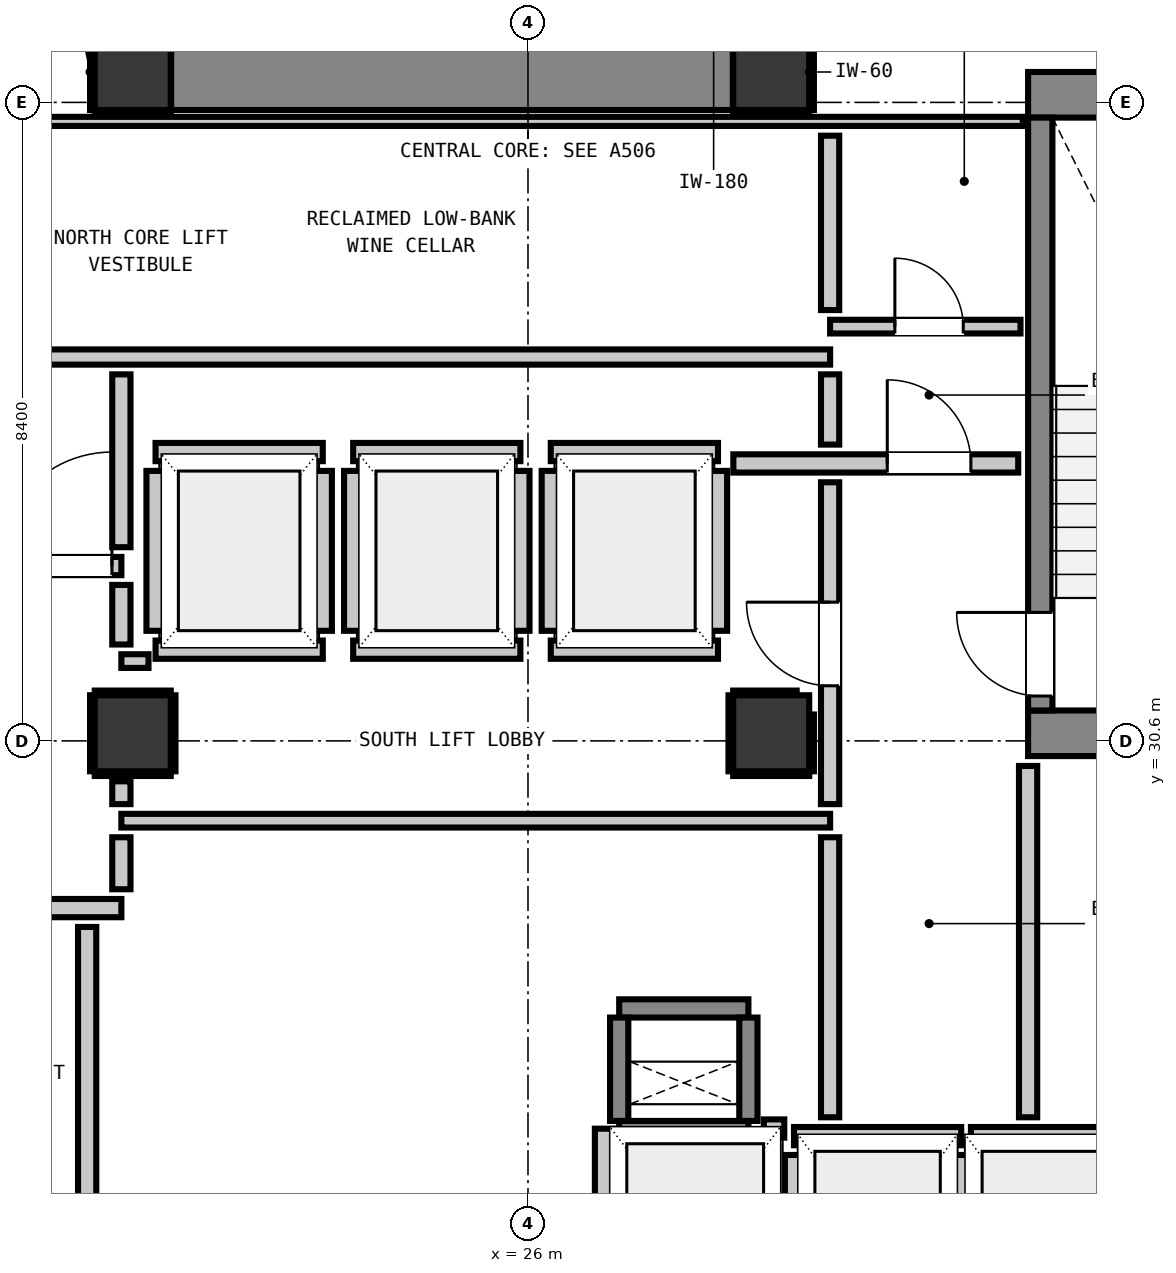
"""IFC4 building model, lengths in metres.
Left out: names, types, materials, properties, quantities, classifications, styles, units other than length and angle.
Written with IfcOpenShell. Run it as: python <this file> out.ifc"""

import sys

from ifc_helpers import new_model, si_unit, direction, frame, frame_2d, origin, origin_2d, place, context, subcontext, project, spatial, rectangle, extrude, element, fill, save


model = new_model("IFC4")
c1 = context("Model", 3, precision=1e-05, world=origin(), true_north=direction((0.0, 1.0)))
c2 = subcontext(c1, "Body", "Model", "MODEL_VIEW")
j1 = project(units=[si_unit("LENGTHUNIT", "METRE"), si_unit("PLANEANGLEUNIT", "RADIAN")], contexts=[c1])
p1 = place(None, origin())
s1 = spatial("IfcSite", under=j1, at=p1, CompositionType="ELEMENT")
p2 = place(p1, origin())
s2 = spatial("IfcBuilding", under=s1, at=p2, CompositionType="ELEMENT")
p3 = place(p2, frame((0.0, 0.0, 109.4)))
s3 = spatial("IfcBuildingStorey", under=s2, at=p3, CompositionType="ELEMENT", Elevation=109.4)
for number, where, z_axis, x_axis in (
    (1, (20.8, 39.4, 0.0), (0.0, 0.0, 1.0), (1.0, 0.0, 0.0)),
    (2, (29.2, 39.4, 0.0), (0.0, 0.0, 1.0), (1.0, 0.0, 0.0)),
):
    element("IfcColumn", number, at=place(p3, frame(where, z_axis=z_axis, x_axis=x_axis)), inside=s3, PredefinedType="COLUMN", context=c2, shape_type="SweptSolid", body=[
        extrude(rectangle(XDim=1.0, YDim=1.0, at=origin_2d()), origin(), (0.0, 0.0, 1.0), 3.32),
    ])
p4 = place(p3, frame((32.58, 39.1, 0.0), z_axis=(0.0, 0.0, 1.0), x_axis=(1.0, 0.0, 0.0)))
e3 = element("IfcWall", 3, at=p4, inside=s3, PredefinedType="SHEAR", context=c2, shape_type="SweptSolid", body=[
    extrude(rectangle(XDim=4.08, YDim=0.6, at=frame_2d((2.04, 0.0))), origin(), (0.0, 0.0, 1.0), 3.32),
])
p5 = place(p3, frame((32.58, 30.7, 0.0), z_axis=(0.0, 0.0, 1.0), x_axis=(1.0, 0.0, 0.0)))
e4 = element("IfcWall", 4, at=p5, inside=s3, PredefinedType="SHEAR", context=c2, shape_type="SweptSolid", body=[
    extrude(rectangle(XDim=3.415, YDim=0.6, at=frame_2d((1.708, 0.0))), origin(), (0.0, 0.0, 1.0), 3.32),
])
p6 = place(p3, frame((21.305, 39.4, 0.0), z_axis=(0.0, 0.0, 1.0), x_axis=(1.0, 0.0, 0.0)))
e5 = element("IfcWall", 5, at=p6, inside=s3, PredefinedType="SHEAR", context=c2, shape_type="SweptSolid", body=[
    extrude(rectangle(XDim=7.39, YDim=1.0, at=frame_2d((3.695, 0.0))), origin(), (0.0, 0.0, 1.0), 3.32),
])
p7 = place(p3, frame((32.74, 31.0, 0.0), z_axis=(0.0, 0.0, 1.0), x_axis=(0.0, 1.0, 0.0)))
e6 = element("IfcWall", 6, at=p7, inside=s3, PredefinedType="SHEAR", context=c2, shape_type="SweptSolid", body=[
    extrude(rectangle(XDim=7.8, YDim=0.32, at=frame_2d((3.9, 0.0))), origin(), (0.0, 0.0, 1.0), 3.32),
])
p8 = place(p7, frame((0.19, 0.0, 0.0)))
e7 = element("IfcOpeningElement", 7, at=p8, cuts=e6, PredefinedType="OPENING", context=c2, shape_type="SweptSolid", body=[
    extrude(rectangle(XDim=1.1, YDim=2.15, at=frame_2d((0.55, 1.075))), frame((0.0, 0.17, 0.0), z_axis=(0.0, -1.0, 0.0), x_axis=(1.0, 0.0, 0.0)), (0.0, 0.0, 1.0), 0.34),
])
for number, where, z_axis, x_axis in (
    (8, (27.2, 25.48, 0.0), (0.0, 0.0, 1.0), (1.0, 0.0, 0.0)),
    (9, (27.2, 27.08, 0.0), (0.0, 0.0, 1.0), (1.0, 0.0, 0.0)),
):
    element("IfcWall", number, at=place(p3, frame(where, z_axis=z_axis, x_axis=x_axis)), inside=s3, PredefinedType="SHEAR", context=c2, shape_type="SweptSolid", body=[
        extrude(rectangle(XDim=1.7, YDim=0.24, at=frame_2d((0.85, 0.0))), origin(), (0.0, 0.0, 1.0), 3.32),
    ])
for number, where, z_axis, x_axis in (
    (10, (27.2, 25.6, 0.0), (0.0, 0.0, 1.0), (0.0, 1.0, 0.0)),
    (11, (28.9, 25.6, 0.0), (0.0, 0.0, 1.0), (0.0, 1.0, 0.0)),
):
    element("IfcWall", number, at=place(p3, frame(where, z_axis=z_axis, x_axis=x_axis)), inside=s3, PredefinedType="SHEAR", context=c2, shape_type="SweptSolid", body=[
        extrude(rectangle(XDim=1.36, YDim=0.24, at=frame_2d((0.68, 0.0))), origin(), (0.0, 0.0, 1.0), 3.32),
    ])
for number, where, z_axis, x_axis in (
    (12, (20.8, 30.7, 0.0), (0.0, 0.0, 1.0), (1.0, 0.0, 0.0)),
    (13, (29.2, 30.7, 0.0), (0.0, 0.0, 1.0), (1.0, 0.0, 0.0)),
):
    element("IfcColumn", number, at=place(p3, frame(where, z_axis=z_axis, x_axis=x_axis)), inside=s3, PredefinedType="COLUMN", context=c2, shape_type="SweptSolid", body=[
        extrude(rectangle(XDim=1.0, YDim=1.0, at=origin_2d()), origin(), (0.0, 0.0, 1.0), 3.32),
    ])
for number, where, z_axis, x_axis in (
    (14, (21.1, 31.8, 0.0), (0.0, 0.0, 1.0), (1.0, 0.0, 0.0)),
    (15, (21.1, 34.4, 0.0), (0.0, 0.0, 1.0), (1.0, 0.0, 0.0)),
):
    element("IfcWall", number, at=place(p3, frame(where, z_axis=z_axis, x_axis=x_axis)), inside=s3, PredefinedType="PARTITIONING", context=c2, shape_type="SweptSolid", body=[
        extrude(rectangle(XDim=2.2, YDim=0.24, at=frame_2d((1.1, 0.0))), origin(), (0.0, 0.0, 1.0), 3.08),
    ])
p9 = place(p3, frame((21.1, 32.048, 0.0), z_axis=(0.0, 0.0, 1.0), x_axis=(0.0, 1.0, 0.0)))
e16 = element("IfcWall", 16, at=p9, inside=s3, PredefinedType="PARTITIONING", context=c2, shape_type="SweptSolid", body=[
    extrude(rectangle(XDim=2.104, YDim=0.24, at=frame_2d((1.052, 0.0))), origin(), (0.0, 0.0, 1.0), 2.315),
])
p10 = place(p3, frame((23.3, 32.048, 0.0), z_axis=(0.0, 0.0, 1.0), x_axis=(0.0, 1.0, 0.0)))
e17 = element("IfcWall", 17, at=p10, inside=s3, PredefinedType="PARTITIONING", context=c2, shape_type="SweptSolid", body=[
    extrude(rectangle(XDim=2.104, YDim=0.24, at=frame_2d((1.052, 0.0))), origin(), (0.0, 0.0, 1.0), 3.08),
])
for number, where, z_axis, x_axis in (
    (18, (23.7, 31.8, 0.0), (0.0, 0.0, 1.0), (1.0, 0.0, 0.0)),
    (19, (23.7, 34.4, 0.0), (0.0, 0.0, 1.0), (1.0, 0.0, 0.0)),
):
    element("IfcWall", number, at=place(p3, frame(where, z_axis=z_axis, x_axis=x_axis)), inside=s3, PredefinedType="PARTITIONING", context=c2, shape_type="SweptSolid", body=[
        extrude(rectangle(XDim=2.2, YDim=0.24, at=frame_2d((1.1, 0.0))), origin(), (0.0, 0.0, 1.0), 3.08),
    ])
for number, where, z_axis, x_axis in (
    (20, (23.7, 32.048, 0.0), (0.0, 0.0, 1.0), (0.0, 1.0, 0.0)),
    (21, (25.9, 32.048, 0.0), (0.0, 0.0, 1.0), (0.0, 1.0, 0.0)),
):
    element("IfcWall", number, at=place(p3, frame(where, z_axis=z_axis, x_axis=x_axis)), inside=s3, PredefinedType="PARTITIONING", context=c2, shape_type="SweptSolid", body=[
        extrude(rectangle(XDim=2.104, YDim=0.24, at=frame_2d((1.052, 0.0))), origin(), (0.0, 0.0, 1.0), 3.08),
    ])
for number, where, z_axis, x_axis in (
    (22, (26.3, 31.8, 0.0), (0.0, 0.0, 1.0), (1.0, 0.0, 0.0)),
    (23, (26.3, 34.4, 0.0), (0.0, 0.0, 1.0), (1.0, 0.0, 0.0)),
):
    element("IfcWall", number, at=place(p3, frame(where, z_axis=z_axis, x_axis=x_axis)), inside=s3, PredefinedType="PARTITIONING", context=c2, shape_type="SweptSolid", body=[
        extrude(rectangle(XDim=2.2, YDim=0.24, at=frame_2d((1.1, 0.0))), origin(), (0.0, 0.0, 1.0), 3.08),
    ])
for number, where, z_axis, x_axis in (
    (24, (26.3, 32.048, 0.0), (0.0, 0.0, 1.0), (0.0, 1.0, 0.0)),
    (25, (28.5, 32.048, 0.0), (0.0, 0.0, 1.0), (0.0, 1.0, 0.0)),
):
    element("IfcWall", number, at=place(p3, frame(where, z_axis=z_axis, x_axis=x_axis)), inside=s3, PredefinedType="PARTITIONING", context=c2, shape_type="SweptSolid", body=[
        extrude(rectangle(XDim=2.104, YDim=0.24, at=frame_2d((1.052, 0.0))), origin(), (0.0, 0.0, 1.0), 3.08),
    ])
p11 = place(p3, frame((29.5, 25.4, 0.0), z_axis=(0.0, 0.0, 1.0), x_axis=(1.0, 0.0, 0.0)))
e26 = element("IfcWall", 26, at=p11, inside=s3, PredefinedType="PARTITIONING", context=c2, shape_type="SweptSolid", body=[
    extrude(rectangle(XDim=2.2, YDim=0.24, at=frame_2d((1.1, 0.0))), origin(), (0.0, 0.0, 1.0), 3.08),
])
p12 = place(p3, frame((29.5, 22.632, 0.0), z_axis=(0.0, 0.0, 1.0), x_axis=(0.0, 1.0, 0.0)))
e27 = element("IfcWall", 27, at=p12, inside=s3, PredefinedType="PARTITIONING", context=c2, shape_type="SweptSolid", body=[
    extrude(rectangle(XDim=2.52, YDim=0.24, at=frame_2d((1.26, 0.0))), origin(), (0.0, 0.0, 1.0), 2.315),
])
p13 = place(p3, frame((31.7, 22.63, 0.0), z_axis=(0.0, 0.0, 1.0), x_axis=(0.0, 1.0, 0.0)))
e28 = element("IfcWall", 28, at=p13, inside=s3, PredefinedType="PARTITIONING", context=c2, shape_type="SweptSolid", body=[
    extrude(rectangle(XDim=2.522, YDim=0.24, at=frame_2d((1.261, 0.0))), origin(), (0.0, 0.0, 1.0), 3.08),
])
p14 = place(p3, frame((31.828, 25.4, 0.0), z_axis=(0.0, 0.0, 1.0), x_axis=(1.0, 0.0, 0.0)))
e29 = element("IfcWall", 29, at=p14, inside=s3, PredefinedType="PARTITIONING", context=c2, shape_type="SweptSolid", body=[
    extrude(rectangle(XDim=2.072, YDim=0.24, at=frame_2d((1.036, 0.0))), origin(), (0.0, 0.0, 1.0), 3.08),
])
p15 = place(p3, frame((29.103, 25.5, 0.0), z_axis=(0.0, 0.0, 1.0), x_axis=(1.0, 0.0, 0.0)))
e30 = element("IfcWall", 30, at=p15, inside=s3, PredefinedType="PARTITIONING", context=c2, shape_type="SweptSolid", body=[
    extrude(rectangle(XDim=0.269, YDim=0.24, at=frame_2d((0.135, 0.0))), origin(), (0.0, 0.0, 1.0), 3.08),
])
p16 = place(p3, frame((27.0, 22.63, 0.0), z_axis=(0.0, 0.0, 1.0), x_axis=(0.0, 1.0, 0.0)))
e31 = element("IfcWall", 31, at=p16, inside=s3, PredefinedType="PARTITIONING", context=c2, shape_type="SweptSolid", body=[
    extrude(rectangle(XDim=2.868, YDim=0.24, at=frame_2d((1.434, 0.0))), origin(), (0.0, 0.0, 1.0), 3.08),
])
p17 = place(p3, frame((17.45, 28.4, 0.0), z_axis=(0.0, 0.0, 1.0), x_axis=(1.0, 0.0, 0.0)))
e32 = element("IfcWall", 32, at=p17, inside=s3, PredefinedType="PARTITIONING", context=c2, shape_type="SweptSolid", body=[
    extrude(rectangle(XDim=3.2, YDim=0.24, at=frame_2d((1.6, 0.0))), origin(), (0.0, 0.0, 1.0), 3.08),
])
p18 = place(p17, frame((0.784, 0.0, 0.0)))
e33 = element("IfcOpeningElement", 33, at=p18, cuts=e32, PredefinedType="OPENING", context=c2, shape_type="SweptSolid", body=[
    extrude(rectangle(XDim=1.1, YDim=2.15, at=frame_2d((0.55, 1.075))), frame((0.0, 0.13, 0.0), z_axis=(0.0, -1.0, 0.0), x_axis=(1.0, 0.0, 0.0)), (0.0, 0.0, 1.0), 0.26),
])
p19 = place(p3, frame((17.45, 32.9, 0.0), z_axis=(0.0, 0.0, 1.0), x_axis=(1.0, 0.0, 0.0)))
e34 = element("IfcWall", 34, at=p19, inside=s3, PredefinedType="PARTITIONING", context=c2, shape_type="SweptSolid", body=[
    extrude(rectangle(XDim=3.2, YDim=0.24, at=frame_2d((1.6, 0.0))), origin(), (0.0, 0.0, 1.0), 3.08),
])
p20 = place(p19, frame((0.159, 0.0, 0.0)))
e35 = element("IfcOpeningElement", 35, at=p20, cuts=e34, PredefinedType="OPENING", context=c2, shape_type="SweptSolid", body=[
    extrude(rectangle(XDim=1.1, YDim=2.15, at=frame_2d((0.55, 1.075))), frame((0.0, 0.13, 0.0), z_axis=(0.0, -1.0, 0.0), x_axis=(1.0, 0.0, 0.0)), (0.0, 0.0, 1.0), 0.26),
])
p21 = place(p19, frame((1.576, 0.0, 0.0)))
e36 = element("IfcOpeningElement", 36, at=p21, cuts=e34, PredefinedType="OPENING", context=c2, shape_type="SweptSolid", body=[
    extrude(rectangle(XDim=1.5, YDim=2.15, at=frame_2d((0.75, 1.075))), frame((0.0, 0.13, 0.0), z_axis=(0.0, -1.0, 0.0), x_axis=(1.0, 0.0, 0.0)), (0.0, 0.0, 1.0), 0.26),
])
p22 = place(p3, frame((28.702, 34.25, 0.0), z_axis=(0.0, 0.0, 1.0), x_axis=(1.0, 0.0, 0.0)))
e37 = element("IfcWall", 37, at=p22, inside=s3, PredefinedType="PARTITIONING", context=c2, shape_type="SweptSolid", body=[
    extrude(rectangle(XDim=3.748, YDim=0.24, at=frame_2d((1.874, 0.0))), origin(), (0.0, 0.0, 1.0), 3.08),
])
p23 = place(p22, frame((2.025, 0.0, 0.0)))
e38 = element("IfcOpeningElement", 38, at=p23, cuts=e37, PredefinedType="OPENING", context=c2, shape_type="SweptSolid", body=[
    extrude(rectangle(XDim=1.1, YDim=2.15, at=frame_2d((0.55, 1.075))), frame((0.0, 0.13, 0.0), z_axis=(0.0, -1.0, 0.0), x_axis=(1.0, 0.0, 0.0)), (0.0, 0.0, 1.0), 0.26),
])
p24 = place(p3, frame((18.95, 35.65, 0.0), z_axis=(0.0, 0.0, 1.0), x_axis=(1.0, 0.0, 0.0)))
e39 = element("IfcWall", 39, at=p24, inside=s3, PredefinedType="PARTITIONING", context=c2, shape_type="SweptSolid", body=[
    extrude(rectangle(XDim=11.025, YDim=0.2, at=frame_2d((5.513, 0.0))), origin(), (0.0, 0.0, 1.0), 3.08),
])
p25 = place(p3, frame((20.65, 29.55, 0.0), z_axis=(0.0, 0.0, 1.0), x_axis=(1.0, 0.0, 0.0)))
e40 = element("IfcWall", 40, at=p25, inside=s3, PredefinedType="PARTITIONING", context=c2, shape_type="SweptSolid", body=[
    extrude(rectangle(XDim=9.325, YDim=0.18, at=frame_2d((4.663, 0.0))), origin(), (0.0, 0.0, 1.0), 3.08),
])
p26 = place(p3, frame((20.65, 31.65, 0.0), z_axis=(0.0, 0.0, 1.0), x_axis=(1.0, 0.0, 0.0)))
e41 = element("IfcWall", 41, at=p26, inside=s3, PredefinedType="PARTITIONING", context=c2, shape_type="SweptSolid", body=[
    extrude(rectangle(XDim=0.357, YDim=0.18, at=frame_2d((0.179, 0.0))), origin(), (0.0, 0.0, 1.0), 3.08),
])
p27 = place(p3, frame((29.975, 36.05, 0.0), z_axis=(0.0, 0.0, 1.0), x_axis=(1.0, 0.0, 0.0)))
e42 = element("IfcWall", 42, at=p27, inside=s3, PredefinedType="PARTITIONING", context=c2, shape_type="SweptSolid", body=[
    extrude(rectangle(XDim=2.505, YDim=0.18, at=frame_2d((1.252, 0.0))), origin(), (0.0, 0.0, 1.0), 3.08),
])
p28 = place(p27, frame((0.852, 0.0, 0.0)))
e43 = element("IfcOpeningElement", 43, at=p28, cuts=e42, PredefinedType="OPENING", context=c2, shape_type="SweptSolid", body=[
    extrude(rectangle(XDim=0.9, YDim=2.1, at=frame_2d((0.45, 1.05))), frame((0.0, 0.1, 0.0), z_axis=(0.0, -1.0, 0.0), x_axis=(1.0, 0.0, 0.0)), (0.0, 0.0, 1.0), 0.2),
])
p29 = place(p3, frame((18.95, 38.75, 0.0), z_axis=(0.0, 0.0, 1.0), x_axis=(1.0, 0.0, 0.0)))
e44 = element("IfcWall", 44, at=p29, inside=s3, PredefinedType="PARTITIONING", context=c2, shape_type="SweptSolid", body=[
    extrude(rectangle(XDim=13.56, YDim=0.12, at=frame_2d((6.78, 0.0))), origin(), (0.0, 0.0, 1.0), 3.08),
])
p30 = place(p3, frame((20.2, 22.586, 0.0), z_axis=(0.0, 0.0, 1.0), x_axis=(0.0, 1.0, 0.0)))
e45 = element("IfcWall", 45, at=p30, inside=s3, PredefinedType="PARTITIONING", context=c2, shape_type="SweptSolid", body=[
    extrude(rectangle(XDim=5.566, YDim=0.24, at=frame_2d((2.783, 0.0))), origin(), (0.0, 0.0, 1.0), 3.08),
])
p31 = place(p3, frame((20.65, 28.648, 0.0), z_axis=(0.0, 0.0, 1.0), x_axis=(0.0, 1.0, 0.0)))
e46 = element("IfcWall", 46, at=p31, inside=s3, PredefinedType="PARTITIONING", context=c2, shape_type="SweptSolid", body=[
    extrude(rectangle(XDim=0.684, YDim=0.24, at=frame_2d((0.342, 0.0))), origin(), (0.0, 0.0, 1.0), 2.315),
])
p32 = place(p3, frame((20.65, 29.768, 0.0), z_axis=(0.0, 0.0, 1.0), x_axis=(0.0, 1.0, 0.0)))
e47 = element("IfcWall", 47, at=p32, inside=s3, PredefinedType="PARTITIONING", context=c2, shape_type="SweptSolid", body=[
    extrude(rectangle(XDim=0.3, YDim=0.24, at=frame_2d((0.15, 0.0))), origin(), (0.0, 0.0, 1.0), 2.315),
])
p33 = place(p3, frame((20.65, 31.868, 0.0), z_axis=(0.0, 0.0, 1.0), x_axis=(0.0, 1.0, 0.0)))
e48 = element("IfcWall", 48, at=p33, inside=s3, PredefinedType="PARTITIONING", context=c2, shape_type="SweptSolid", body=[
    extrude(rectangle(XDim=0.784, YDim=0.24, at=frame_2d((0.392, 0.0))), origin(), (0.0, 0.0, 1.0), 2.315),
])
p34 = place(p3, frame((20.65, 33.148, 0.0), z_axis=(0.0, 0.0, 1.0), x_axis=(0.0, 1.0, 0.0)))
e49 = element("IfcWall", 49, at=p34, inside=s3, PredefinedType="PARTITIONING", context=c2, shape_type="SweptSolid", body=[
    extrude(rectangle(XDim=2.274, YDim=0.24, at=frame_2d((1.137, 0.0))), origin(), (0.0, 0.0, 1.0), 2.315),
])
p35 = place(p3, frame((29.975, 25.648, 0.0), z_axis=(0.0, 0.0, 1.0), x_axis=(0.0, 1.0, 0.0)))
e50 = element("IfcWall", 50, at=p35, inside=s3, PredefinedType="PARTITIONING", context=c2, shape_type="SweptSolid", body=[
    extrude(rectangle(XDim=3.684, YDim=0.24, at=frame_2d((1.842, 0.0))), origin(), (0.0, 0.0, 1.0), 3.08),
])
p36 = place(p3, frame((29.975, 29.768, 0.0), z_axis=(0.0, 0.0, 1.0), x_axis=(0.0, 1.0, 0.0)))
e51 = element("IfcWall", 51, at=p36, inside=s3, PredefinedType="PARTITIONING", context=c2, shape_type="SweptSolid", body=[
    extrude(rectangle(XDim=4.234, YDim=0.24, at=frame_2d((2.117, 0.0))), origin(), (0.0, 0.0, 1.0), 3.08),
])
p37 = place(p36, frame((1.557, 0.0, 0.0)))
e52 = element("IfcOpeningElement", 52, at=p37, cuts=e51, PredefinedType="OPENING", context=c2, shape_type="SweptSolid", body=[
    extrude(rectangle(XDim=1.1, YDim=2.15, at=frame_2d((0.55, 1.075))), frame((0.0, 0.13, 0.0), z_axis=(0.0, -1.0, 0.0), x_axis=(1.0, 0.0, 0.0)), (0.0, 0.0, 1.0), 0.26),
])
p38 = place(p3, frame((29.975, 34.498, 0.0), z_axis=(0.0, 0.0, 1.0), x_axis=(0.0, 1.0, 0.0)))
e53 = element("IfcWall", 53, at=p38, inside=s3, PredefinedType="PARTITIONING", context=c2, shape_type="SweptSolid", body=[
    extrude(rectangle(XDim=0.924, YDim=0.24, at=frame_2d((0.462, 0.0))), origin(), (0.0, 0.0, 1.0), 3.08),
])
p39 = place(p3, frame((29.975, 36.268, 0.0), z_axis=(0.0, 0.0, 1.0), x_axis=(0.0, 1.0, 0.0)))
e54 = element("IfcWall", 54, at=p39, inside=s3, PredefinedType="PARTITIONING", context=c2, shape_type="SweptSolid", body=[
    extrude(rectangle(XDim=2.294, YDim=0.24, at=frame_2d((1.147, 0.0))), origin(), (0.0, 0.0, 1.0), 3.08),
])
p40 = place(p3, frame((32.58, 25.648, 0.0), z_axis=(0.0, 0.0, 1.0), x_axis=(0.0, 1.0, 0.0)))
e55 = element("IfcWall", 55, at=p40, inside=s3, PredefinedType="PARTITIONING", context=c2, shape_type="SweptSolid", body=[
    extrude(rectangle(XDim=4.622, YDim=0.24, at=frame_2d((2.311, 0.0))), origin(), (0.0, 0.0, 1.0), 3.08),
])
for number, where, z_axis, x_axis in (
    (56, (20.3, 38.868, 0.0), (0.0, 0.0, 1.0), (1.0, 0.0, 0.0)),
    (57, (20.268, 38.9, 0.0), (0.0, 0.0, 1.0), (0.0, 1.0, 0.0)),
    (58, (28.7, 38.868, 0.0), (0.0, 0.0, 1.0), (1.0, 0.0, 0.0)),
    (59, (29.732, 38.9, 0.0), (0.0, 0.0, 1.0), (0.0, 1.0, 0.0)),
    (60, (20.3, 30.168, 0.0), (0.0, 0.0, 1.0), (1.0, 0.0, 0.0)),
    (61, (20.3, 31.232, 0.0), (0.0, 0.0, 1.0), (1.0, 0.0, 0.0)),
    (62, (20.268, 30.2, 0.0), (0.0, 0.0, 1.0), (0.0, 1.0, 0.0)),
    (63, (21.332, 30.2, 0.0), (0.0, 0.0, 1.0), (0.0, 1.0, 0.0)),
    (64, (28.7, 30.168, 0.0), (0.0, 0.0, 1.0), (1.0, 0.0, 0.0)),
):
    element("IfcWall", number, at=place(p3, frame(where, z_axis=z_axis, x_axis=x_axis)), inside=s3, PredefinedType="PARTITIONING", context=c2, shape_type="SweptSolid", body=[
        extrude(rectangle(XDim=1.0, YDim=0.06, at=frame_2d((0.5, 0.0))), origin(), (0.0, 0.0, 1.0), 1.45),
    ])
p41 = place(p3, frame((28.7, 31.232, 0.0), z_axis=(0.0, 0.0, 1.0), x_axis=(1.0, 0.0, 0.0)))
e65 = element("IfcWall", 65, at=p41, inside=s3, PredefinedType="PARTITIONING", context=c2, shape_type="SweptSolid", body=[
    extrude(rectangle(XDim=0.835, YDim=0.06, at=frame_2d((0.417, 0.0))), origin(), (0.0, 0.0, 1.0), 1.45),
])
p42 = place(p3, frame((28.668, 30.2, 0.0), z_axis=(0.0, 0.0, 1.0), x_axis=(0.0, 1.0, 0.0)))
e66 = element("IfcWall", 66, at=p42, inside=s3, PredefinedType="PARTITIONING", context=c2, shape_type="SweptSolid", body=[
    extrude(rectangle(XDim=1.0, YDim=0.06, at=frame_2d((0.5, 0.0))), origin(), (0.0, 0.0, 1.0), 1.45),
])
p43 = place(p3, frame((29.732, 30.2, 0.0), z_axis=(0.0, 0.0, 1.0), x_axis=(0.0, 1.0, 0.0)))
e67 = element("IfcWall", 67, at=p43, inside=s3, PredefinedType="PARTITIONING", context=c2, shape_type="SweptSolid", body=[
    extrude(rectangle(XDim=0.747, YDim=0.06, at=frame_2d((0.374, 0.0))), origin(), (0.0, 0.0, 1.0), 1.45),
])
p44 = place(p8, origin())
e68 = element("IfcDoor", 68, at=p44, inside=s3, OperationType="SINGLE_SWING_RIGHT", PredefinedType="DOOR", context=c2, shape_type="SweptSolid", body=[
    extrude(rectangle(XDim=1.1, YDim=2.15, at=frame_2d((0.55, 1.075))), frame((0.0, 0.025, 0.0), z_axis=(0.0, -1.0, 0.0), x_axis=(1.0, 0.0, 0.0)), (0.0, 0.0, 1.0), 0.05),
])
fill(e7, e68)
p45 = place(p37, origin())
e69 = element("IfcDoor", 69, at=p45, inside=s3, OperationType="SINGLE_SWING_RIGHT", PredefinedType="DOOR", context=c2, shape_type="SweptSolid", body=[
    extrude(rectangle(XDim=1.1, YDim=2.15, at=frame_2d((0.55, 1.075))), frame((0.0, 0.025, 0.0), z_axis=(0.0, -1.0, 0.0), x_axis=(1.0, 0.0, 0.0)), (0.0, 0.0, 1.0), 0.05),
])
fill(e52, e69)
p46 = place(p23, origin())
e70 = element("IfcDoor", 70, at=p46, inside=s3, OperationType="SINGLE_SWING_LEFT", PredefinedType="DOOR", context=c2, shape_type="SweptSolid", body=[
    extrude(rectangle(XDim=1.1, YDim=2.15, at=frame_2d((0.55, 1.075))), frame((0.0, 0.025, 0.0), z_axis=(0.0, -1.0, 0.0), x_axis=(1.0, 0.0, 0.0)), (0.0, 0.0, 1.0), 0.05),
])
fill(e38, e70)
p47 = place(p21, origin())
e71 = element("IfcDoor", 71, at=p47, inside=s3, OperationType="SINGLE_SWING_RIGHT", PredefinedType="DOOR", context=c2, shape_type="SweptSolid", body=[
    extrude(rectangle(XDim=1.5, YDim=2.15, at=frame_2d((0.75, 1.075))), frame((0.0, 0.025, 0.0), z_axis=(0.0, -1.0, 0.0), x_axis=(1.0, 0.0, 0.0)), (0.0, 0.0, 1.0), 0.05),
])
fill(e36, e71)
p48 = place(p28, origin())
e72 = element("IfcDoor", 72, at=p48, inside=s3, OperationType="SINGLE_SWING_LEFT", PredefinedType="DOOR", context=c2, shape_type="SweptSolid", body=[
    extrude(rectangle(XDim=0.9, YDim=2.1, at=frame_2d((0.45, 1.05))), frame((0.0, 0.025, 0.0), z_axis=(0.0, -1.0, 0.0), x_axis=(1.0, 0.0, 0.0)), (0.0, 0.0, 1.0), 0.05),
])
fill(e43, e72)
save(model, sys.argv[1])
